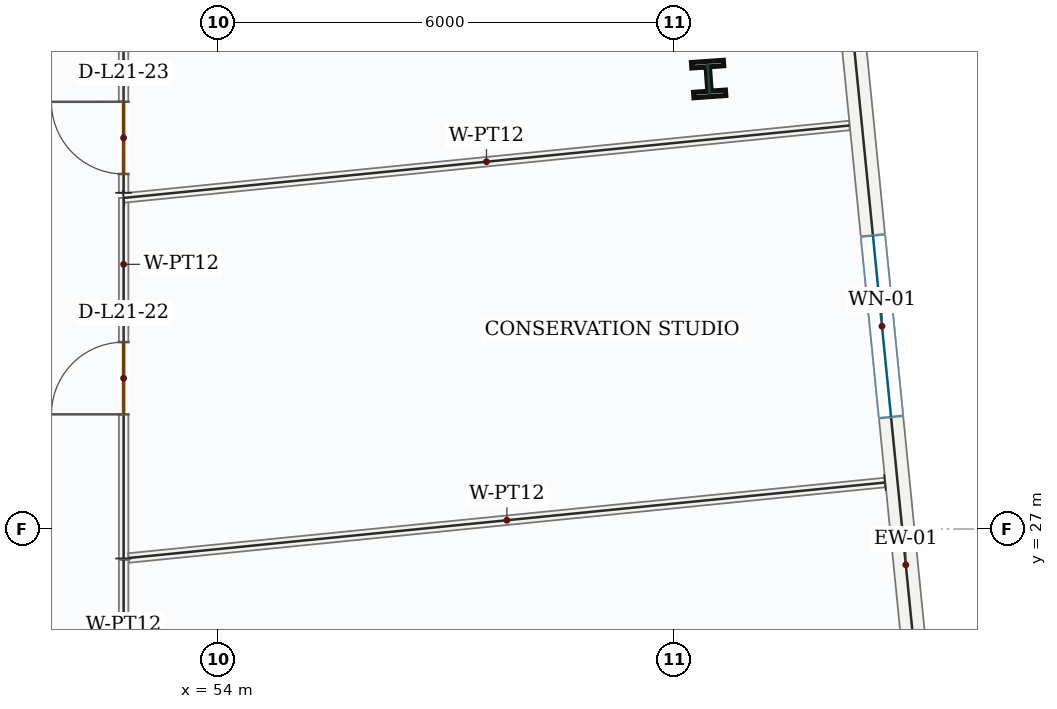
"""IFC4 building model, lengths in metres.
Left out: names, types, materials, properties, quantities, classifications, styles, units other than length and angle.
Written with IfcOpenShell. Run it as: python <this file> out.ifc"""

import sys

from ifc_helpers import new_model, si_unit, direction, frame, frame_2d, origin, origin_2d, place, context, subcontext, project, spatial, rectangle, i_section, extrude, source, transform, mapped, element, fill, save


model = new_model("IFC4")
c1 = context("Model", 3, precision=1e-05, world=origin(), true_north=direction((0.0, 1.0)))
c2 = subcontext(c1, "Body", "Model", "MODEL_VIEW")
j1 = project(units=[si_unit("LENGTHUNIT", "METRE"), si_unit("PLANEANGLEUNIT", "RADIAN")], contexts=[c1])
p1 = place(None, origin())
s1 = spatial("IfcSite", under=j1, at=p1, CompositionType="ELEMENT")
p2 = place(p1, origin())
s2 = spatial("IfcBuilding", under=s1, at=p2, CompositionType="ELEMENT")
p3 = place(p2, frame((0.0, 0.0, 96.3)))
s3 = spatial("IfcBuildingStorey", under=s2, at=p3, CompositionType="ELEMENT", Elevation=96.3)
m1 = source(origin(), c2, "Body", "SweptSolid", [
    extrude(i_section(OverallWidth=0.421, OverallDepth=0.465, WebThickness=0.045, FlangeThickness=0.073, FilletRadius=0.018, at=origin_2d()), origin(), (0.0, 0.0, 1.0), 4.2),
])
p4 = place(p3, frame((60.447, 32.92, 0.0), z_axis=(0.0, 0.0, 1.0), x_axis=(0.99756405026, 0.069756473744, 0.0)))
e1 = element("IfcColumn", 1, at=p4, inside=s3, PredefinedType="COLUMN", context=c2, shape_type="MappedRepresentation", body=[
    mapped(m1, transform((0.0, 0.0, 0.0), x_axis=(1.0, 0.0, 0.0), y_axis=(0.0, 1.0, 0.0), z_axis=(0.0, 0.0, 1.0), scale=1.0)),
])
p5 = place(p3, frame((62.235, 34.603, 0.0), z_axis=(0.0, 0.0, 1.0), x_axis=(0.099303907908, -0.995057151059, 0.0)))
e2 = element("IfcWall", 2, at=p5, inside=s3, PredefinedType="SOLIDWALL", context=c2, shape_type="SweptSolid", body=[
    extrude(rectangle(XDim=9.92, YDim=0.32, at=frame_2d((4.96, 0.0))), origin(), (0.0, 0.0, 1.0), 3.95),
])
p6 = place(p5, frame((3.76, 0.0, 0.85)))
e3 = element("IfcOpeningElement", 3, at=p6, cuts=e2, PredefinedType="OPENING", context=c2, shape_type="SweptSolid", body=[
    extrude(rectangle(XDim=2.4, YDim=1.8, at=frame_2d((1.2, 0.9))), frame((0.0, 0.17, 0.0), z_axis=(0.0, -1.0, 0.0), x_axis=(1.0, 0.0, 0.0)), (0.0, 0.0, 1.0), 0.34),
])
p7 = place(p3, frame((52.75, 26.612, 0.0), z_axis=(0.0, 0.0, 1.0), x_axis=(0.0, 1.0, 0.0)))
e4 = element("IfcWall", 4, at=p7, inside=s3, PredefinedType="PARTITIONING", context=c2, shape_type="SweptSolid", body=[
    extrude(rectangle(XDim=4.743, YDim=0.125, at=frame_2d((2.372, 0.0))), origin(), (0.0, 0.0, 1.0), 3.95),
])
p8 = place(p7, frame((1.897, 0.0, 0.0)))
e5 = element("IfcOpeningElement", 5, at=p8, cuts=e4, PredefinedType="OPENING", context=c2, shape_type="SweptSolid", body=[
    extrude(rectangle(XDim=0.95, YDim=2.15, at=frame_2d((0.475, 1.075))), frame((0.0, 0.073, 0.0), z_axis=(0.0, -1.0, 0.0), x_axis=(1.0, 0.0, 0.0)), (0.0, 0.0, 1.0), 0.145),
])
m2 = source(origin(), c2, "Body", "SweptSolid", [
    extrude(rectangle(XDim=9.595, YDim=0.125, at=frame_2d((4.798, 0.0))), origin(), (0.0, 0.0, 1.0), 3.95),
])
p9 = place(p3, frame((52.75, 31.355, 0.0), z_axis=(0.0, 0.0, 1.0), x_axis=(0.995054305912, 0.099332413068, 0.0)))
e6 = element("IfcWall", 6, at=p9, inside=s3, PredefinedType="PARTITIONING", context=c2, shape_type="MappedRepresentation", body=[
    mapped(m2, transform((0.0, 0.0, 0.0), x_axis=(1.0, 0.0, 0.0), y_axis=(0.0, 1.0, 0.0), z_axis=(0.0, 0.0, 1.0), scale=1.0)),
])
m3 = source(origin(), c2, "Body", "SweptSolid", [
    extrude(rectangle(XDim=9.999, YDim=0.125, at=frame_2d((5.0, 0.0))), origin(), (0.0, 0.0, 1.0), 3.95),
])
p10 = place(p3, frame((62.767, 27.612, 0.0), z_axis=(0.0, 0.0, 1.0), x_axis=(-0.995054581391, -0.099329653443, 0.0)))
e7 = element("IfcWall", 7, at=p10, inside=s3, PredefinedType="PARTITIONING", context=c2, shape_type="MappedRepresentation", body=[
    mapped(m3, transform((0.0, 0.0, 0.0), x_axis=(1.0, 0.0, 0.0), y_axis=(0.0, 1.0, 0.0), z_axis=(0.0, 0.0, 1.0), scale=1.0)),
])
p11 = place(p3, frame((52.75, 31.423, 0.0), z_axis=(0.0, 0.0, 1.0), x_axis=(-0.000470366834, 0.999999889378, 0.0)))
e8 = element("IfcWall", 8, at=p11, inside=s3, PredefinedType="PARTITIONING", context=c2, shape_type="SweptSolid", body=[
    extrude(rectangle(XDim=2.076, YDim=0.125, at=frame_2d((1.038, 0.0))), origin(), (0.0, 0.0, 1.0), 3.95),
])
p12 = place(p11, frame((0.248, 0.0, 0.0)))
e9 = element("IfcOpeningElement", 9, at=p12, cuts=e8, PredefinedType="OPENING", context=c2, shape_type="SweptSolid", body=[
    extrude(rectangle(XDim=0.95, YDim=2.15, at=frame_2d((0.475, 1.075))), frame((0.0, 0.073, 0.0), z_axis=(0.0, -1.0, 0.0), x_axis=(1.0, 0.0, 0.0)), (0.0, 0.0, 1.0), 0.145),
])
p13 = place(p3, frame((52.75, 20.568, 0.0), z_axis=(0.0, 0.0, 1.0), x_axis=(0.0, 1.0, 0.0)))
e10 = element("IfcWall", 10, at=p13, inside=s3, PredefinedType="PARTITIONING", context=c2, shape_type="SweptSolid", body=[
    extrude(rectangle(XDim=6.024, YDim=0.125, at=frame_2d((3.012, 0.0))), origin(), (0.0, 0.0, 1.0), 3.95),
])
p14 = place(p13, frame((2.537, 0.0, 0.0)))
e11 = element("IfcOpeningElement", 11, at=p14, cuts=e10, PredefinedType="OPENING", context=c2, shape_type="SweptSolid", body=[
    extrude(rectangle(XDim=0.95, YDim=2.15, at=frame_2d((0.475, 1.075))), frame((0.0, 0.073, 0.0), z_axis=(0.0, -1.0, 0.0), x_axis=(1.0, 0.0, 0.0)), (0.0, 0.0, 1.0), 0.145),
])
m4 = source(origin(), c2, "Body", "SweptSolid", [
    extrude(rectangle(XDim=2.4, YDim=1.8, at=frame_2d((1.2, 0.9))), frame((0.0, 0.03, 0.0), z_axis=(0.0, -1.0, 0.0), x_axis=(1.0, 0.0, 0.0)), (0.0, 0.0, 1.0), 0.06),
])
p15 = place(p6, origin())
e12 = element("IfcWindow", 12, at=p15, inside=s3, PartitioningType="DOUBLE_PANEL_VERTICAL", PredefinedType="WINDOW", context=c2, shape_type="MappedRepresentation", body=[
    mapped(m4, transform((0.0, 0.0, 0.0), x_axis=(1.0, 0.0, 0.0), y_axis=(0.0, 1.0, 0.0), z_axis=(0.0, 0.0, 1.0), scale=1.0)),
])
fill(e3, e12)
m5 = source(origin(), c2, "Body", "SweptSolid", [
    extrude(rectangle(XDim=0.95, YDim=2.15, at=frame_2d((0.475, 1.075))), frame((0.0, 0.025, 0.0), z_axis=(0.0, -1.0, 0.0), x_axis=(1.0, 0.0, 0.0)), (0.0, 0.0, 1.0), 0.05),
])
p16 = place(p8, origin())
e13 = element("IfcDoor", 13, at=p16, inside=s3, OperationType="SINGLE_SWING_LEFT", PredefinedType="DOOR", context=c2, shape_type="MappedRepresentation", body=[
    mapped(m5, transform((0.0, 0.0, 0.0), x_axis=(1.0, 0.0, 0.0), y_axis=(0.0, 1.0, 0.0), z_axis=(0.0, 0.0, 1.0), scale=1.0)),
])
fill(e5, e13)
p17 = place(p12, origin())
e14 = element("IfcDoor", 14, at=p17, inside=s3, OperationType="SINGLE_SWING_RIGHT", PredefinedType="DOOR", context=c2, shape_type="MappedRepresentation", body=[
    mapped(m5, transform((0.0, 0.0, 0.0), x_axis=(1.0, 0.0, 0.0), y_axis=(0.0, 1.0, 0.0), z_axis=(0.0, 0.0, 1.0), scale=1.0)),
])
fill(e9, e14)
save(model, sys.argv[1])
